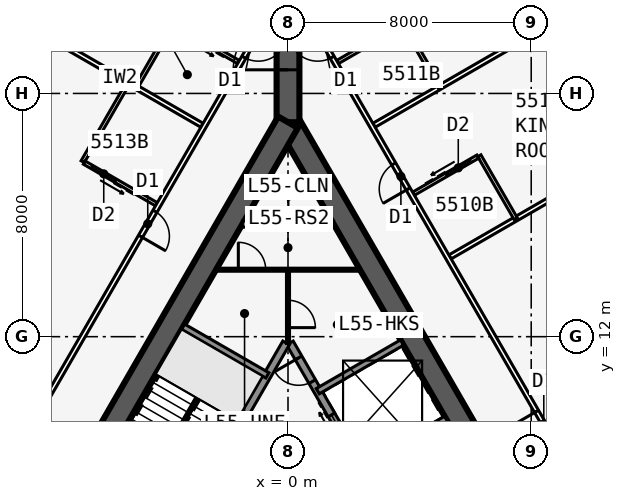
"""IFC4 building model, lengths in metres.
Left out: names, types, materials, properties, quantities, classifications, styles, units other than length and angle.
Written with IfcOpenShell. Run it as: python <this file> out.ifc"""

import sys

from ifc_helpers import new_model, si_unit, direction, frame, frame_2d, origin, place, context, subcontext, project, spatial, rectangle, extrude, element, fill, save


model = new_model("IFC4")
c1 = context("Model", 3, precision=1e-05, world=origin(), true_north=direction((0.0, 1.0)))
c2 = subcontext(c1, "Body", "Model", "MODEL_VIEW")
j1 = project(units=[si_unit("LENGTHUNIT", "METRE"), si_unit("PLANEANGLEUNIT", "RADIAN")], contexts=[c1])
p1 = place(None, origin())
s1 = spatial("IfcSite", under=j1, at=p1, CompositionType="ELEMENT")
p2 = place(p1, origin())
s2 = spatial("IfcBuilding", under=s1, at=p2, CompositionType="ELEMENT")
p3 = place(p2, frame((0.0, 0.0, 208.1)))
s3 = spatial("IfcBuildingStorey", under=s2, at=p3, CompositionType="ELEMENT", Elevation=208.1)
p4 = place(p3, frame((16.5, -9.526, 0.0), z_axis=(0.0, 0.0, 1.0), x_axis=(-0.499999749417, 0.866025548458, 0.0)))
e1 = element("IfcWall", 1, at=p4, inside=s3, PredefinedType="SHEAR", context=c2, shape_type="SweptSolid", body=[
    extrude(rectangle(XDim=33.0, YDim=0.75, at=frame_2d((16.5, 0.0))), origin(), (0.0, 0.0, 1.0), 3.6),
])
p5 = place(p4, frame((14.15, 0.0, 0.0)))
e2 = element("IfcOpeningElement", 2, at=p5, cuts=e1, PredefinedType="OPENING", context=c2, shape_type="SweptSolid", body=[
    extrude(rectangle(XDim=1.8, YDim=2.13, at=frame_2d((0.9, 1.065))), frame((0.0, 0.385, 0.0), z_axis=(0.0, -1.0, 0.0), x_axis=(1.0, 0.0, 0.0)), (0.0, 0.0, 1.0), 0.77),
])
p6 = place(p4, frame((12.6, 0.0, 0.0)))
e3 = element("IfcOpeningElement", 3, at=p6, cuts=e1, PredefinedType="OPENING", context=c2, shape_type="SweptSolid", body=[
    extrude(rectangle(XDim=1.0, YDim=2.13, at=frame_2d((0.5, 1.065))), frame((0.0, 0.385, 0.0), z_axis=(0.0, -1.0, 0.0), x_axis=(1.0, 0.0, 0.0)), (0.0, 0.0, 1.0), 0.77),
])
p7 = place(p3, frame((5.379, 2.586, 0.0), z_axis=(0.0, 0.0, 1.0), x_axis=(-0.500001375892, 0.866024609411, 0.0)))
e4 = element("IfcWall", 4, at=p7, inside=s3, PredefinedType="SOLIDWALL", context=c2, shape_type="SweptSolid", body=[
    extrude(rectangle(XDim=10.633, YDim=0.25, at=frame_2d((5.316, 0.0))), origin(), (0.0, 0.0, 1.0), 3.435),
])
p8 = place(p7, frame((9.164, 0.0, 0.0)))
e5 = element("IfcOpeningElement", 5, at=p8, cuts=e4, PredefinedType="OPENING", context=c2, shape_type="SweptSolid", body=[
    extrude(rectangle(XDim=0.9, YDim=2.13, at=frame_2d((0.45, 1.065))), frame((0.0, 0.135, 0.0), z_axis=(0.0, -1.0, 0.0), x_axis=(1.0, 0.0, 0.0)), (0.0, 0.0, 1.0), 0.27),
])
p9 = place(p7, frame((1.0, 0.0, 0.0)))
e6 = element("IfcOpeningElement", 6, at=p9, cuts=e4, PredefinedType="OPENING", context=c2, shape_type="SweptSolid", body=[
    extrude(rectangle(XDim=1.1, YDim=2.13, at=frame_2d((0.55, 1.065))), frame((0.0, 0.135, 0.0), z_axis=(0.0, -1.0, 0.0), x_axis=(1.0, 0.0, 0.0)), (0.0, 0.0, 1.0), 0.27),
])
p10 = place(p7, frame((3.9, 0.0, 0.0)))
e7 = element("IfcOpeningElement", 7, at=p10, cuts=e4, PredefinedType="OPENING", context=c2, shape_type="SweptSolid", body=[
    extrude(rectangle(XDim=1.1, YDim=2.13, at=frame_2d((0.55, 1.065))), frame((0.0, 0.135, 0.0), z_axis=(0.0, -1.0, 0.0), x_axis=(1.0, 0.0, 0.0)), (0.0, 0.0, 1.0), 0.27),
])
p11 = place(p7, frame((6.8, 0.0, 0.0)))
e8 = element("IfcOpeningElement", 8, at=p11, cuts=e4, PredefinedType="OPENING", context=c2, shape_type="SweptSolid", body=[
    extrude(rectangle(XDim=1.1, YDim=2.13, at=frame_2d((0.55, 1.065))), frame((0.0, 0.135, 0.0), z_axis=(0.0, -1.0, 0.0), x_axis=(1.0, 0.0, 0.0)), (0.0, 0.0, 1.0), 0.27),
])
for number, where, z_axis, x_axis in (
    (9, (2.429, 7.696, 0.0), (0.0, 0.0, 1.0), (0.866, 0.5, 0.0)),
    (10, (0.979, 10.207, 0.0), (0.0, 0.0, 1.0), (0.866, 0.5, 0.0)),
):
    element("IfcWall", number, at=place(p3, frame(where, z_axis=z_axis, x_axis=x_axis)), inside=s3, PredefinedType="SOLIDWALL", context=c2, shape_type="SweptSolid", body=[
        extrude(rectangle(XDim=3.2, YDim=0.2, at=frame_2d((1.6, 0.0))), origin(), (0.0, 0.0, 1.0), 3.435),
    ])
p12 = place(p3, frame((0.0, 19.052, 0.0), z_axis=(0.0, 0.0, 1.0), x_axis=(-0.499999749417, -0.866025548458, 0.0)))
e11 = element("IfcWall", 11, at=p12, inside=s3, PredefinedType="SHEAR", context=c2, shape_type="SweptSolid", body=[
    extrude(rectangle(XDim=33.0, YDim=0.75, at=frame_2d((16.5, 0.0))), origin(), (0.0, 0.0, 1.0), 3.6),
])
p13 = place(p12, frame((14.15, 0.0, 0.0)))
e12 = element("IfcOpeningElement", 12, at=p13, cuts=e11, PredefinedType="OPENING", context=c2, shape_type="SweptSolid", body=[
    extrude(rectangle(XDim=1.8, YDim=2.13, at=frame_2d((0.9, 1.065))), frame((0.0, 0.385, 0.0), z_axis=(0.0, -1.0, 0.0), x_axis=(1.0, 0.0, 0.0)), (0.0, 0.0, 1.0), 0.77),
])
p14 = place(p12, frame((12.6, 0.0, 0.0)))
e13 = element("IfcOpeningElement", 13, at=p14, cuts=e11, PredefinedType="OPENING", context=c2, shape_type="SweptSolid", body=[
    extrude(rectangle(XDim=1.0, YDim=2.13, at=frame_2d((0.5, 1.065))), frame((0.0, 0.385, 0.0), z_axis=(0.0, -1.0, 0.0), x_axis=(1.0, 0.0, 0.0)), (0.0, 0.0, 1.0), 0.77),
])
p15 = place(p3, frame((-0.062, 11.794, 0.0), z_axis=(0.0, 0.0, 1.0), x_axis=(-0.500006680225, -0.86602154692, 0.0)))
e14 = element("IfcWall", 14, at=p15, inside=s3, PredefinedType="SOLIDWALL", context=c2, shape_type="SweptSolid", body=[
    extrude(rectangle(XDim=7.733, YDim=0.25, at=frame_2d((3.866, 0.0))), origin(), (0.0, 0.0, 1.0), 3.435),
])
p16 = place(p3, frame((-0.679, 10.727, 0.0), z_axis=(0.0, 0.0, 1.0), x_axis=(-0.866008981251, 0.500028443584, 0.0)))
e15 = element("IfcWall", 15, at=p16, inside=s3, PredefinedType="SOLIDWALL", context=c2, shape_type="SweptSolid", body=[
    extrude(rectangle(XDim=3.2, YDim=0.2, at=frame_2d((1.6, 0.0))), origin(), (0.0, 0.0, 1.0), 3.435),
])
p17 = place(p3, frame((0.0, 19.052, 0.0), z_axis=(0.0, 0.0, 1.0), x_axis=(0.0, 1.0, 0.0)))
e16 = element("IfcWall", 16, at=p17, inside=s3, PredefinedType="SHEAR", context=c2, shape_type="SweptSolid", body=[
    extrude(rectangle(XDim=4.746, YDim=0.75, at=frame_2d((2.373, 0.0))), origin(), (0.0, 0.0, 1.0), 3.6),
])
p18 = place(p17, frame((1.725, 0.0, 0.0)))
e17 = element("IfcOpeningElement", 17, at=p18, cuts=e16, PredefinedType="OPENING", context=c2, shape_type="SweptSolid", body=[
    extrude(rectangle(XDim=1.8, YDim=2.13, at=frame_2d((0.9, 1.065))), frame((0.0, 0.385, 0.0), z_axis=(0.0, -1.0, 0.0), x_axis=(1.0, 0.0, 0.0)), (0.0, 0.0, 1.0), 0.77),
])
p19 = place(p3, frame((11.754, 18.304, 0.0), z_axis=(0.0, 0.0, 1.0), x_axis=(-0.664348996191, 0.747422511876, 0.0)))
e18 = element("IfcWall", 18, at=p19, inside=s3, PredefinedType="STANDARD", context=c2, shape_type="SweptSolid", body=[
    extrude(rectangle(XDim=5.105, YDim=0.25, at=frame_2d((2.552, 0.0))), origin(), (0.0, 0.0, 1.0), 3.435),
])
p20 = place(p19, frame((0.752, 0.0, 0.45)))
e19 = element("IfcOpeningElement", 19, at=p20, cuts=e18, PredefinedType="OPENING", context=c2, shape_type="SweptSolid", body=[
    extrude(rectangle(XDim=3.6, YDim=2.6, at=frame_2d((1.8, 1.3))), frame((0.0, 0.135, 0.0), z_axis=(0.0, -1.0, 0.0), x_axis=(1.0, 0.0, 0.0)), (0.0, 0.0, 1.0), 0.27),
])
p21 = place(p3, frame((20.102, -11.115, 0.0), z_axis=(0.0, 0.0, 1.0), x_axis=(-0.500000265775, 0.866025250339, 0.0)))
e20 = element("IfcWall", 20, at=p21, inside=s3, PredefinedType="PARTITIONING", context=c2, shape_type="SweptSolid", body=[
    extrude(rectangle(XDim=39.354, YDim=0.15, at=frame_2d((19.677, 0.0))), origin(), (0.0, 0.0, 1.0), 3.435),
])
p22 = place(p21, frame((1.665, 0.0, 0.0)))
e21 = element("IfcOpeningElement", 21, at=p22, cuts=e20, PredefinedType="OPENING", context=c2, shape_type="SweptSolid", body=[
    extrude(rectangle(XDim=0.95, YDim=2.13, at=frame_2d((0.475, 1.065))), frame((0.0, 0.085, 0.0), z_axis=(0.0, -1.0, 0.0), x_axis=(1.0, 0.0, 0.0)), (0.0, 0.0, 1.0), 0.17),
])
p23 = place(p21, frame((12.902, 0.0, 0.0)))
e22 = element("IfcOpeningElement", 22, at=p23, cuts=e20, PredefinedType="OPENING", context=c2, shape_type="SweptSolid", body=[
    extrude(rectangle(XDim=0.95, YDim=2.13, at=frame_2d((0.475, 1.065))), frame((0.0, 0.085, 0.0), z_axis=(0.0, -1.0, 0.0), x_axis=(1.0, 0.0, 0.0)), (0.0, 0.0, 1.0), 0.17),
])
p24 = place(p21, frame((17.302, 0.0, 0.0)))
e23 = element("IfcOpeningElement", 23, at=p24, cuts=e20, PredefinedType="OPENING", context=c2, shape_type="SweptSolid", body=[
    extrude(rectangle(XDim=0.95, YDim=2.13, at=frame_2d((0.475, 1.065))), frame((0.0, 0.085, 0.0), z_axis=(0.0, -1.0, 0.0), x_axis=(1.0, 0.0, 0.0)), (0.0, 0.0, 1.0), 0.17),
])
p25 = place(p21, frame((22.902, 0.0, 0.0)))
e24 = element("IfcOpeningElement", 24, at=p25, cuts=e20, PredefinedType="OPENING", context=c2, shape_type="SweptSolid", body=[
    extrude(rectangle(XDim=0.95, YDim=2.13, at=frame_2d((0.475, 1.065))), frame((0.0, 0.085, 0.0), z_axis=(0.0, -1.0, 0.0), x_axis=(1.0, 0.0, 0.0)), (0.0, 0.0, 1.0), 0.17),
])
p26 = place(p21, frame((32.302, 0.0, 0.0)))
e25 = element("IfcOpeningElement", 25, at=p26, cuts=e20, PredefinedType="OPENING", context=c2, shape_type="SweptSolid", body=[
    extrude(rectangle(XDim=0.95, YDim=2.13, at=frame_2d((0.475, 1.065))), frame((0.0, 0.085, 0.0), z_axis=(0.0, -1.0, 0.0), x_axis=(1.0, 0.0, 0.0)), (0.0, 0.0, 1.0), 0.17),
])
p27 = place(p21, frame((37.302, 0.0, 0.0)))
e26 = element("IfcOpeningElement", 26, at=p27, cuts=e20, PredefinedType="OPENING", context=c2, shape_type="SweptSolid", body=[
    extrude(rectangle(XDim=0.95, YDim=2.13, at=frame_2d((0.475, 1.065))), frame((0.0, 0.085, 0.0), z_axis=(0.0, -1.0, 0.0), x_axis=(1.0, 0.0, 0.0)), (0.0, 0.0, 1.0), 0.17),
])
p28 = place(p3, frame((5.329, 14.623, 0.0), z_axis=(0.0, 0.0, 1.0), x_axis=(0.866017877653, 0.500013035415, 0.0)))
e27 = element("IfcWall", 27, at=p28, inside=s3, PredefinedType="PARTITIONING", context=c2, shape_type="SweptSolid", body=[
    extrude(rectangle(XDim=7.273, YDim=0.15, at=frame_2d((3.636, 0.0))), origin(), (0.0, 0.0, 1.0), 2.589),
])
p29 = place(p3, frame((2.829, 18.954, 0.0), z_axis=(0.0, 0.0, 1.0), x_axis=(0.866026604282, 0.499997920671, 0.0)))
e28 = element("IfcWall", 28, at=p29, inside=s3, PredefinedType="PARTITIONING", context=c2, shape_type="SweptSolid", body=[
    extrude(rectangle(XDim=6.24, YDim=0.15, at=frame_2d((3.12, 0.0))), origin(), (0.0, 0.0, 1.0), 2.589),
])
p30 = place(p3, frame((7.493, 15.873, 0.0), z_axis=(0.0, 0.0, 1.0), x_axis=(-0.499957262057, 0.866050077142, 0.0)))
e29 = element("IfcWall", 29, at=p30, inside=s3, PredefinedType="PLUMBINGWALL", context=c2, shape_type="SweptSolid", body=[
    extrude(rectangle(XDim=2.4, YDim=0.12, at=frame_2d((1.2, 0.0))), origin(), (0.0, 0.0, 1.0), 3.435),
])
p31 = place(p3, frame((4.128, 16.702, 0.0), z_axis=(0.0, 0.0, 1.0), x_axis=(0.866048967903, 0.499959183527, 0.0)))
e30 = element("IfcWall", 30, at=p31, inside=s3, PredefinedType="PLUMBINGWALL", context=c2, shape_type="SweptSolid", body=[
    extrude(rectangle(XDim=2.44, YDim=0.12, at=frame_2d((1.22, 0.0))), origin(), (0.0, 0.0, 1.0), 3.435),
])
p32 = place(p31, frame((1.25, 0.0, 0.0)))
e31 = element("IfcOpeningElement", 31, at=p32, cuts=e30, PredefinedType="OPENING", context=c2, shape_type="SweptSolid", body=[
    extrude(rectangle(XDim=0.9, YDim=2.13, at=frame_2d((0.45, 1.065))), frame((0.0, 0.07, 0.0), z_axis=(0.0, -1.0, 0.0), x_axis=(1.0, 0.0, 0.0)), (0.0, 0.0, 1.0), 0.14),
])
p33 = place(p3, frame((4.993, 20.204, 0.0), z_axis=(0.0, 0.0, 1.0), x_axis=(-0.500001309137, 0.866024647952, 0.0)))
e32 = element("IfcWall", 32, at=p33, inside=s3, PredefinedType="PLUMBINGWALL", context=c2, shape_type="SweptSolid", body=[
    extrude(rectangle(XDim=2.4, YDim=0.12, at=frame_2d((1.2, 0.0))), origin(), (0.0, 0.0, 1.0), 3.435),
])
p34 = place(p3, frame((1.628, 21.032, 0.0), z_axis=(0.0, 0.0, 1.0), x_axis=(0.866048967903, 0.499959183527, 0.0)))
e33 = element("IfcWall", 33, at=p34, inside=s3, PredefinedType="PLUMBINGWALL", context=c2, shape_type="SweptSolid", body=[
    extrude(rectangle(XDim=2.44, YDim=0.12, at=frame_2d((1.22, 0.0))), origin(), (0.0, 0.0, 1.0), 3.435),
])
p35 = place(p34, frame((1.25, 0.0, 0.0)))
e34 = element("IfcOpeningElement", 34, at=p35, cuts=e33, PredefinedType="OPENING", context=c2, shape_type="SweptSolid", body=[
    extrude(rectangle(XDim=0.9, YDim=2.13, at=frame_2d((0.45, 1.065))), frame((0.0, 0.07, 0.0), z_axis=(0.0, -1.0, 0.0), x_axis=(1.0, 0.0, 0.0)), (0.0, 0.0, 1.0), 0.14),
])
p36 = place(p3, frame((-0.425, 22.966, 0.0), z_axis=(0.0, 0.0, 1.0), x_axis=(-0.500000265775, -0.866025250339, 0.0)))
e35 = element("IfcWall", 35, at=p36, inside=s3, PredefinedType="PARTITIONING", context=c2, shape_type="SweptSolid", body=[
    extrude(rectangle(XDim=39.354, YDim=0.15, at=frame_2d((19.677, 0.0))), origin(), (0.0, 0.0, 1.0), 3.435),
])
p37 = place(p36, frame((1.102, 0.0, 0.0)))
e36 = element("IfcOpeningElement", 36, at=p37, cuts=e35, PredefinedType="OPENING", context=c2, shape_type="SweptSolid", body=[
    extrude(rectangle(XDim=0.95, YDim=2.13, at=frame_2d((0.475, 1.065))), frame((0.0, 0.085, 0.0), z_axis=(0.0, -1.0, 0.0), x_axis=(1.0, 0.0, 0.0)), (0.0, 0.0, 1.0), 0.17),
])
p38 = place(p36, frame((7.902, 0.0, 0.0)))
e37 = element("IfcOpeningElement", 37, at=p38, cuts=e35, PredefinedType="OPENING", context=c2, shape_type="SweptSolid", body=[
    extrude(rectangle(XDim=0.95, YDim=2.13, at=frame_2d((0.475, 1.065))), frame((0.0, 0.085, 0.0), z_axis=(0.0, -1.0, 0.0), x_axis=(1.0, 0.0, 0.0)), (0.0, 0.0, 1.0), 0.17),
])
p39 = place(p36, frame((17.302, 0.0, 0.0)))
e38 = element("IfcOpeningElement", 38, at=p39, cuts=e35, PredefinedType="OPENING", context=c2, shape_type="SweptSolid", body=[
    extrude(rectangle(XDim=0.95, YDim=2.13, at=frame_2d((0.475, 1.065))), frame((0.0, 0.085, 0.0), z_axis=(0.0, -1.0, 0.0), x_axis=(1.0, 0.0, 0.0)), (0.0, 0.0, 1.0), 0.17),
])
p40 = place(p36, frame((26.702, 0.0, 0.0)))
e39 = element("IfcOpeningElement", 39, at=p40, cuts=e35, PredefinedType="OPENING", context=c2, shape_type="SweptSolid", body=[
    extrude(rectangle(XDim=0.95, YDim=2.13, at=frame_2d((0.475, 1.065))), frame((0.0, 0.085, 0.0), z_axis=(0.0, -1.0, 0.0), x_axis=(1.0, 0.0, 0.0)), (0.0, 0.0, 1.0), 0.17),
])
p41 = place(p36, frame((37.302, 0.0, 0.0)))
e40 = element("IfcOpeningElement", 40, at=p41, cuts=e35, PredefinedType="OPENING", context=c2, shape_type="SweptSolid", body=[
    extrude(rectangle(XDim=0.95, YDim=2.13, at=frame_2d((0.475, 1.065))), frame((0.0, 0.085, 0.0), z_axis=(0.0, -1.0, 0.0), x_axis=(1.0, 0.0, 0.0)), (0.0, 0.0, 1.0), 0.17),
])
p42 = place(p3, frame((-2.829, 18.954, 0.0), z_axis=(0.0, 0.0, 1.0), x_axis=(-0.866026604282, 0.499997920671, 0.0)))
e41 = element("IfcWall", 41, at=p42, inside=s3, PredefinedType="PARTITIONING", context=c2, shape_type="SweptSolid", body=[
    extrude(rectangle(XDim=6.24, YDim=0.15, at=frame_2d((3.12, 0.0))), origin(), (0.0, 0.0, 1.0), 2.589),
])
p43 = place(p3, frame((-3.793, 22.282, 0.0), z_axis=(0.0, 0.0, 1.0), x_axis=(-0.500001309137, -0.866024647952, 0.0)))
e42 = element("IfcWall", 42, at=p43, inside=s3, PredefinedType="PLUMBINGWALL", context=c2, shape_type="SweptSolid", body=[
    extrude(rectangle(XDim=2.4, YDim=0.12, at=frame_2d((1.2, 0.0))), origin(), (0.0, 0.0, 1.0), 3.435),
])
p44 = place(p3, frame((-1.628, 21.032, 0.0), z_axis=(0.0, 0.0, 1.0), x_axis=(-0.866048967903, 0.499959183527, 0.0)))
e43 = element("IfcWall", 43, at=p44, inside=s3, PredefinedType="PLUMBINGWALL", context=c2, shape_type="SweptSolid", body=[
    extrude(rectangle(XDim=2.44, YDim=0.12, at=frame_2d((1.22, 0.0))), origin(), (0.0, 0.0, 1.0), 3.435),
])
p45 = place(p44, frame((1.25, 0.0, 0.0)))
e44 = element("IfcOpeningElement", 44, at=p45, cuts=e43, PredefinedType="OPENING", context=c2, shape_type="SweptSolid", body=[
    extrude(rectangle(XDim=0.9, YDim=2.13, at=frame_2d((0.45, 1.065))), frame((0.0, 0.07, 0.0), z_axis=(0.0, -1.0, 0.0), x_axis=(1.0, 0.0, 0.0)), (0.0, 0.0, 1.0), 0.14),
])
p46 = place(p3, frame((-5.253, 20.354, 0.0), z_axis=(0.0, 0.0, 1.0), x_axis=(-0.499990139034, -0.866031096941, 0.0)))
e45 = element("IfcWall", 45, at=p46, inside=s3, PredefinedType="PLUMBINGWALL", context=c2, shape_type="SweptSolid", body=[
    extrude(rectangle(XDim=3.0, YDim=0.12, at=frame_2d((1.5, 0.0))), origin(), (0.0, 0.0, 1.0), 3.435),
])
p47 = place(p3, frame((-4.329, 16.355, 0.0), z_axis=(0.0, 0.0, 1.0), x_axis=(-0.866035715982, 0.499982138324, 0.0)))
e46 = element("IfcWall", 46, at=p47, inside=s3, PredefinedType="PLUMBINGWALL", context=c2, shape_type="SweptSolid", body=[
    extrude(rectangle(XDim=2.74, YDim=0.12, at=frame_2d((1.37, 0.0))), origin(), (0.0, 0.0, 1.0), 3.435),
])
p48 = place(p47, frame((1.55, 0.0, 0.0)))
e47 = element("IfcOpeningElement", 47, at=p48, cuts=e46, PredefinedType="OPENING", context=c2, shape_type="SweptSolid", body=[
    extrude(rectangle(XDim=0.9, YDim=2.13, at=frame_2d((0.45, 1.065))), frame((0.0, 0.07, 0.0), z_axis=(0.0, -1.0, 0.0), x_axis=(1.0, 0.0, 0.0)), (0.0, 0.0, 1.0), 0.14),
])
p49 = place(p3, frame((-1.501, 15.703, 0.0), z_axis=(0.0, 0.0, 1.0), x_axis=(1.0, 0.0, 0.0)))
e48 = element("IfcWall", 48, at=p49, inside=s3, PredefinedType="SOLIDWALL", context=c2, shape_type="SweptSolid", body=[
    extrude(rectangle(XDim=3.002, YDim=0.2, at=frame_2d((1.501, 0.0))), origin(), (0.0, 0.0, 1.0), 3.435),
])
p50 = place(p3, frame((-2.367, 14.203, 0.0), z_axis=(0.0, 0.0, 1.0), x_axis=(1.0, 0.0, 0.0)))
e49 = element("IfcWall", 49, at=p50, inside=s3, PredefinedType="PARTITIONING", context=c2, shape_type="SweptSolid", body=[
    extrude(rectangle(XDim=4.734, YDim=0.1, at=frame_2d((2.367, 0.0))), origin(), (0.0, 0.0, 1.0), 3.435),
])
p51 = place(p50, frame((0.734, 0.0, 0.0)))
e50 = element("IfcOpeningElement", 50, at=p51, cuts=e49, PredefinedType="OPENING", context=c2, shape_type="SweptSolid", body=[
    extrude(rectangle(XDim=0.9, YDim=2.13, at=frame_2d((0.45, 1.065))), frame((0.0, 0.06, 0.0), z_axis=(0.0, -1.0, 0.0), x_axis=(1.0, 0.0, 0.0)), (0.0, 0.0, 1.0), 0.12),
])
p52 = place(p3, frame((0.0, 14.203, 0.0), z_axis=(0.0, 0.0, 1.0), x_axis=(0.0, -1.0, 0.0)))
e51 = element("IfcWall", 51, at=p52, inside=s3, PredefinedType="PARTITIONING", context=c2, shape_type="SweptSolid", body=[
    extrude(rectangle(XDim=2.425, YDim=0.1, at=frame_2d((1.213, 0.0))), origin(), (0.0, 0.0, 1.0), 3.435),
])
p53 = place(p52, frame((1.005, 0.0, 0.0)))
e52 = element("IfcOpeningElement", 52, at=p53, cuts=e51, PredefinedType="OPENING", context=c2, shape_type="SweptSolid", body=[
    extrude(rectangle(XDim=0.9, YDim=2.13, at=frame_2d((0.45, 1.065))), frame((0.0, 0.06, 0.0), z_axis=(0.0, -1.0, 0.0), x_axis=(1.0, 0.0, 0.0)), (0.0, 0.0, 1.0), 0.12),
])
p54 = place(p3, frame((-2.988, 9.978, 0.0), z_axis=(0.0, 0.0, 1.0), x_axis=(-0.499992232847, -0.866029888106, 0.0)))
e53 = element("IfcWall", 53, at=p54, inside=s3, PredefinedType="SOLIDWALL", context=c2, shape_type="SweptSolid", body=[
    extrude(rectangle(XDim=2.794, YDim=0.1, at=frame_2d((1.397, 0.0))), origin(), (0.0, 0.0, 1.0), 3.6),
])
p55 = place(p25, origin())
e54 = element("IfcDoor", 54, at=p55, inside=s3, OperationType="SINGLE_SWING_RIGHT", PredefinedType="DOOR", context=c2, shape_type="SweptSolid", body=[
    extrude(rectangle(XDim=0.95, YDim=2.13, at=frame_2d((0.475, 1.065))), frame((0.0, 0.025, 0.0), z_axis=(0.0, -1.0, 0.0), x_axis=(1.0, 0.0, 0.0)), (0.0, 0.0, 1.0), 0.05),
])
fill(e24, e54)
p56 = place(p32, origin())
e55 = element("IfcDoor", 55, at=p56, inside=s3, OperationType="SLIDING_TO_LEFT", PredefinedType="DOOR", context=c2, shape_type="SweptSolid", body=[
    extrude(rectangle(XDim=0.9, YDim=2.13, at=frame_2d((0.45, 1.065))), frame((0.0, 0.025, 0.0), z_axis=(0.0, -1.0, 0.0), x_axis=(1.0, 0.0, 0.0)), (0.0, 0.0, 1.0), 0.05),
])
fill(e31, e55)
p57 = place(p26, origin())
e56 = element("IfcDoor", 56, at=p57, inside=s3, OperationType="SINGLE_SWING_LEFT", PredefinedType="DOOR", context=c2, shape_type="SweptSolid", body=[
    extrude(rectangle(XDim=0.95, YDim=2.13, at=frame_2d((0.475, 1.065))), frame((0.0, 0.025, 0.0), z_axis=(0.0, -1.0, 0.0), x_axis=(1.0, 0.0, 0.0)), (0.0, 0.0, 1.0), 0.05),
])
fill(e25, e56)
p58 = place(p27, origin())
e57 = element("IfcDoor", 57, at=p58, inside=s3, OperationType="SINGLE_SWING_RIGHT", PredefinedType="DOOR", context=c2, shape_type="SweptSolid", body=[
    extrude(rectangle(XDim=0.95, YDim=2.13, at=frame_2d((0.475, 1.065))), frame((0.0, 0.025, 0.0), z_axis=(0.0, -1.0, 0.0), x_axis=(1.0, 0.0, 0.0)), (0.0, 0.0, 1.0), 0.05),
])
fill(e26, e57)
p59 = place(p37, origin())
e58 = element("IfcDoor", 58, at=p59, inside=s3, OperationType="SINGLE_SWING_LEFT", PredefinedType="DOOR", context=c2, shape_type="SweptSolid", body=[
    extrude(rectangle(XDim=0.95, YDim=2.13, at=frame_2d((0.475, 1.065))), frame((0.0, 0.025, 0.0), z_axis=(0.0, -1.0, 0.0), x_axis=(1.0, 0.0, 0.0)), (0.0, 0.0, 1.0), 0.05),
])
fill(e36, e58)
p60 = place(p48, origin())
e59 = element("IfcDoor", 59, at=p60, inside=s3, OperationType="SLIDING_TO_LEFT", PredefinedType="DOOR", context=c2, shape_type="SweptSolid", body=[
    extrude(rectangle(XDim=0.9, YDim=2.13, at=frame_2d((0.45, 1.065))), frame((0.0, 0.025, 0.0), z_axis=(0.0, -1.0, 0.0), x_axis=(1.0, 0.0, 0.0)), (0.0, 0.0, 1.0), 0.05),
])
fill(e47, e59)
p61 = place(p38, origin())
e60 = element("IfcDoor", 60, at=p61, inside=s3, OperationType="SINGLE_SWING_RIGHT", PredefinedType="DOOR", context=c2, shape_type="SweptSolid", body=[
    extrude(rectangle(XDim=0.95, YDim=2.13, at=frame_2d((0.475, 1.065))), frame((0.0, 0.025, 0.0), z_axis=(0.0, -1.0, 0.0), x_axis=(1.0, 0.0, 0.0)), (0.0, 0.0, 1.0), 0.05),
])
fill(e37, e60)
p62 = place(p18, origin())
e61 = element("IfcDoor", 61, at=p62, inside=s3, OperationType="DOUBLE_DOOR_DOUBLE_SWING", PredefinedType="DOOR", context=c2, shape_type="SweptSolid", body=[
    extrude(rectangle(XDim=1.8, YDim=2.13, at=frame_2d((0.9, 1.065))), frame((0.0, 0.025, 0.0), z_axis=(0.0, -1.0, 0.0), x_axis=(1.0, 0.0, 0.0)), (0.0, 0.0, 1.0), 0.05),
])
fill(e17, e61)
p63 = place(p51, origin())
e62 = element("IfcDoor", 62, at=p63, inside=s3, OperationType="SINGLE_SWING_LEFT", PredefinedType="DOOR", context=c2, shape_type="SweptSolid", body=[
    extrude(rectangle(XDim=0.9, YDim=2.13, at=frame_2d((0.45, 1.065))), frame((0.0, 0.025, 0.0), z_axis=(0.0, -1.0, 0.0), x_axis=(1.0, 0.0, 0.0)), (0.0, 0.0, 1.0), 0.05),
])
fill(e50, e62)
p64 = place(p8, origin())
e63 = element("IfcDoor", 63, at=p64, inside=s3, OperationType="SINGLE_SWING_RIGHT", PredefinedType="DOOR", context=c2, shape_type="SweptSolid", body=[
    extrude(rectangle(XDim=0.9, YDim=2.13, at=frame_2d((0.45, 1.065))), frame((0.0, 0.025, 0.0), z_axis=(0.0, -1.0, 0.0), x_axis=(1.0, 0.0, 0.0)), (0.0, 0.0, 1.0), 0.05),
])
fill(e5, e63)
p65 = place(p53, origin())
e64 = element("IfcDoor", 64, at=p65, inside=s3, OperationType="SINGLE_SWING_RIGHT", PredefinedType="DOOR", context=c2, shape_type="SweptSolid", body=[
    extrude(rectangle(XDim=0.9, YDim=2.13, at=frame_2d((0.45, 1.065))), frame((0.0, 0.025, 0.0), z_axis=(0.0, -1.0, 0.0), x_axis=(1.0, 0.0, 0.0)), (0.0, 0.0, 1.0), 0.05),
])
fill(e52, e64)
p66 = place(p11, origin())
e65 = element("IfcDoor", 65, at=p66, inside=s3, OperationType="DOUBLE_DOOR_SLIDING", PredefinedType="USERDEFINED", context=c2, shape_type="SweptSolid", body=[
    extrude(rectangle(XDim=1.1, YDim=2.13, at=frame_2d((0.55, 1.065))), frame((0.0, 0.025, 0.0), z_axis=(0.0, -1.0, 0.0), x_axis=(1.0, 0.0, 0.0)), (0.0, 0.0, 1.0), 0.05),
])
fill(e8, e65)
save(model, sys.argv[1])
